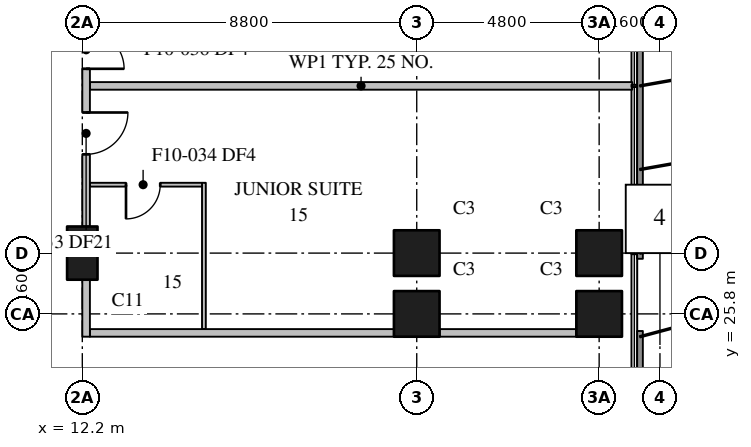
"""IFC4 building model, lengths in metres.
Left out: names, types, materials, properties, quantities, classifications, styles, units other than length and angle.
Written with IfcOpenShell. Run it as: python <this file> out.ifc"""

import sys

from ifc_helpers import new_model, si_unit, direction, frame, frame_2d, origin, origin_2d, place, context, subcontext, project, spatial, rectangle, extrude, element, fill, save


model = new_model("IFC4")
c1 = context("Model", 3, precision=1e-05, world=origin(), true_north=direction((0.0, 1.0)))
c2 = subcontext(c1, "Body", "Model", "MODEL_VIEW")
j1 = project(units=[si_unit("LENGTHUNIT", "METRE"), si_unit("PLANEANGLEUNIT", "RADIAN")], contexts=[c1])
p1 = place(None, origin())
s1 = spatial("IfcSite", under=j1, at=p1, CompositionType="ELEMENT")
p2 = place(p1, origin())
s2 = spatial("IfcBuilding", under=s1, at=p2, CompositionType="ELEMENT")
p3 = place(p2, frame((0.0, 0.0, 101.9)))
s3 = spatial("IfcBuildingStorey", under=s2, at=p3, CompositionType="ELEMENT", Elevation=101.9)
p4 = place(p3, frame((12.2, 27.4, 0.0), z_axis=(0.0, 0.0, 1.0), x_axis=(0.0, 1.0, 0.0)))
e1 = element("IfcColumn", 1, at=p4, inside=s3, PredefinedType="COLUMN", context=c2, shape_type="SweptSolid", body=[
    extrude(rectangle(XDim=1.4, YDim=0.8, at=origin_2d()), origin(), (0.0, 0.0, 1.0), 5.5),
])
for number, where, z_axis, x_axis in (
    (2, (21.0, 25.8, 0.0), (0.0, 0.0, 1.0), (1.0, 0.0, 0.0)),
    (3, (21.0, 27.4, 0.0), (0.0, 0.0, 1.0), (1.0, 0.0, 0.0)),
    (4, (25.8, 25.8, 0.0), (0.0, 0.0, 1.0), (1.0, 0.0, 0.0)),
    (5, (25.8, 27.4, 0.0), (0.0, 0.0, 1.0), (1.0, 0.0, 0.0)),
):
    element("IfcColumn", number, at=place(p3, frame(where, z_axis=z_axis, x_axis=x_axis)), inside=s3, PredefinedType="COLUMN", context=c2, shape_type="SweptSolid", body=[
        extrude(rectangle(XDim=1.2, YDim=1.2, at=origin_2d()), origin(), (0.0, 0.0, 1.0), 5.5),
    ])
p5 = place(p3, frame((12.4, 31.8, 0.0), z_axis=(0.0, 0.0, 1.0), x_axis=(1.0, 0.0, 0.0)))
e6 = element("IfcWall", 6, at=p5, inside=s3, PredefinedType="PARTITIONING", context=c2, shape_type="SweptSolid", body=[
    extrude(rectangle(XDim=14.27, YDim=0.2, at=frame_2d((7.135, 0.0))), origin(), (0.0, 0.0, 1.0), 5.2),
])
p6 = place(p3, frame((12.3, 25.2, 0.0), z_axis=(0.0, 0.0, 1.0), x_axis=(0.0, 1.0, 0.0)))
e7 = element("IfcWall", 7, at=p6, inside=s3, PredefinedType="PARTITIONING", context=c2, shape_type="SweptSolid", body=[
    extrude(rectangle(XDim=1.5, YDim=0.2, at=frame_2d((0.75, 0.0))), origin(), (0.0, 0.0, 1.0), 5.2),
])
p7 = place(p3, frame((12.3, 35.5, 0.0), z_axis=(0.0, 0.0, 1.0), x_axis=(0.0, -1.0, 0.0)))
e8 = element("IfcWall", 8, at=p7, inside=s3, PredefinedType="PARTITIONING", context=c2, shape_type="SweptSolid", body=[
    extrude(rectangle(XDim=7.4, YDim=0.2, at=frame_2d((3.7, 0.0))), origin(), (0.0, 0.0, 1.0), 5.2),
])
p8 = place(p7, frame((4.4, 0.0, 0.0)))
e9 = element("IfcOpeningElement", 9, at=p8, cuts=e8, PredefinedType="OPENING", context=c2, shape_type="SweptSolid", body=[
    extrude(rectangle(XDim=1.1, YDim=2.1, at=frame_2d((0.55, 1.05))), frame((0.0, 0.11, 0.0), z_axis=(0.0, -1.0, 0.0), x_axis=(1.0, 0.0, 0.0)), (0.0, 0.0, 1.0), 0.22),
])
p9 = place(p7, frame((2.25, 0.0, 0.0)))
e10 = element("IfcOpeningElement", 10, at=p9, cuts=e8, PredefinedType="OPENING", context=c2, shape_type="SweptSolid", body=[
    extrude(rectangle(XDim=1.0, YDim=2.1, at=frame_2d((0.5, 1.05))), frame((0.0, 0.11, 0.0), z_axis=(0.0, -1.0, 0.0), x_axis=(1.0, 0.0, 0.0)), (0.0, 0.0, 1.0), 0.22),
])
p10 = place(p3, frame((12.4, 25.3, 0.0), z_axis=(0.0, 0.0, 1.0), x_axis=(1.0, 0.0, 0.0)))
e11 = element("IfcWall", 11, at=p10, inside=s3, PredefinedType="PARTITIONING", context=c2, shape_type="SweptSolid", body=[
    extrude(rectangle(XDim=8.0, YDim=0.2, at=frame_2d((4.0, 0.0))), origin(), (0.0, 0.0, 1.0), 5.2),
])
p11 = place(p3, frame((21.6, 25.3, 0.0), z_axis=(0.0, 0.0, 1.0), x_axis=(1.0, 0.0, 0.0)))
e12 = element("IfcWall", 12, at=p11, inside=s3, PredefinedType="PARTITIONING", context=c2, shape_type="SweptSolid", body=[
    extrude(rectangle(XDim=3.6, YDim=0.2, at=frame_2d((1.8, 0.0))), origin(), (0.0, 0.0, 1.0), 5.2),
])
p12 = place(p3, frame((15.4, 25.4, 0.0), z_axis=(0.0, 0.0, 1.0), x_axis=(0.0, 1.0, 0.0)))
e13 = element("IfcWall", 13, at=p12, inside=s3, PredefinedType="PARTITIONING", context=c2, shape_type="SweptSolid", body=[
    extrude(rectangle(XDim=3.85, YDim=0.1, at=frame_2d((1.925, 0.0))), origin(), (0.0, 0.0, 1.0), 5.2),
])
p13 = place(p3, frame((15.35, 29.2, 0.0), z_axis=(0.0, 0.0, 1.0), x_axis=(-1.0, 0.0, 0.0)))
e14 = element("IfcWall", 14, at=p13, inside=s3, PredefinedType="PARTITIONING", context=c2, shape_type="SweptSolid", body=[
    extrude(rectangle(XDim=2.95, YDim=0.1, at=frame_2d((1.475, 0.0))), origin(), (0.0, 0.0, 1.0), 5.2),
])
p14 = place(p13, frame((1.1, 0.0, 0.0)))
e15 = element("IfcOpeningElement", 15, at=p14, cuts=e14, PredefinedType="OPENING", context=c2, shape_type="SweptSolid", body=[
    extrude(rectangle(XDim=0.9, YDim=2.1, at=frame_2d((0.45, 1.05))), frame((0.0, 0.06, 0.0), z_axis=(0.0, -1.0, 0.0), x_axis=(1.0, 0.0, 0.0)), (0.0, 0.0, 1.0), 0.12),
])
p15 = place(p8, origin())
e16 = element("IfcDoor", 16, at=p15, inside=s3, OperationType="SINGLE_SWING_LEFT", PredefinedType="DOOR", context=c2, shape_type="SweptSolid", body=[
    extrude(rectangle(XDim=1.1, YDim=2.1, at=frame_2d((0.55, 1.05))), frame((0.0, 0.025, 0.0), z_axis=(0.0, -1.0, 0.0), x_axis=(1.0, 0.0, 0.0)), (0.0, 0.0, 1.0), 0.05),
])
fill(e9, e16)
p16 = place(p14, origin())
e17 = element("IfcDoor", 17, at=p16, inside=s3, OperationType="SINGLE_SWING_RIGHT", PredefinedType="DOOR", context=c2, shape_type="SweptSolid", body=[
    extrude(rectangle(XDim=0.9, YDim=2.1, at=frame_2d((0.45, 1.05))), frame((0.0, 0.025, 0.0), z_axis=(0.0, -1.0, 0.0), x_axis=(1.0, 0.0, 0.0)), (0.0, 0.0, 1.0), 0.05),
])
fill(e15, e17)
p17 = place(p9, origin())
e18 = element("IfcDoor", 18, at=p17, inside=s3, OperationType="SINGLE_SWING_RIGHT", PredefinedType="DOOR", context=c2, shape_type="SweptSolid", body=[
    extrude(rectangle(XDim=1.0, YDim=2.1, at=frame_2d((0.5, 1.05))), frame((0.0, 0.025, 0.0), z_axis=(0.0, -1.0, 0.0), x_axis=(1.0, 0.0, 0.0)), (0.0, 0.0, 1.0), 0.05),
])
fill(e10, e18)
save(model, sys.argv[1])
